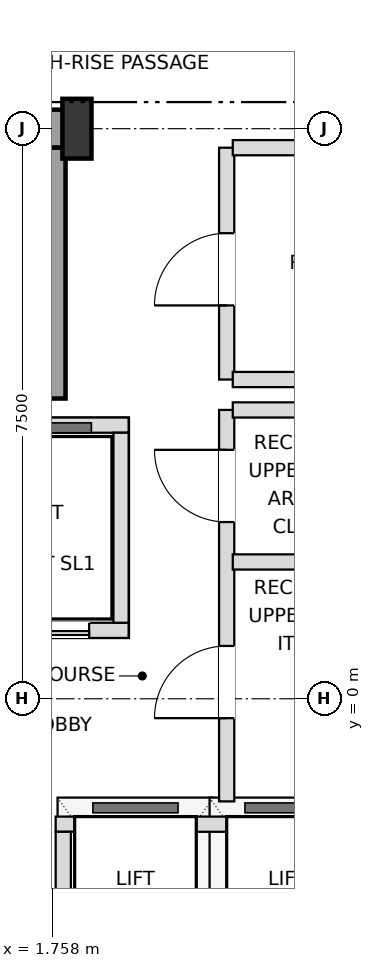
"""IFC4 building model, lengths in metres.
Left out: names, types, materials, properties, quantities, classifications, styles, units other than length and angle.
Written with IfcOpenShell. Run it as: python <this file> out.ifc"""

import sys

from ifc_helpers import new_model, si_unit, direction, frame, frame_2d, origin, origin_2d, place, context, subcontext, project, spatial, rectangle, i_section, extrude, element, fill, save


model = new_model("IFC4")
c1 = context("Model", 3, precision=1e-05, world=origin(), true_north=direction((0.0, 1.0)))
c2 = subcontext(c1, "Body", "Model", "MODEL_VIEW")
j1 = project(units=[si_unit("LENGTHUNIT", "METRE"), si_unit("PLANEANGLEUNIT", "RADIAN")], contexts=[c1])
p1 = place(None, origin())
s1 = spatial("IfcSite", under=j1, at=p1, CompositionType="ELEMENT")
p2 = place(p1, origin())
s2 = spatial("IfcBuilding", under=s1, at=p2, CompositionType="ELEMENT")
p3 = place(p2, frame((0.0, 0.0, 229.5)))
s3 = spatial("IfcBuildingStorey", under=s2, at=p3, CompositionType="ELEMENT", Elevation=229.5)
p4 = place(p3, frame((2.08, 7.5, 0.0), z_axis=(0.0, 0.0, 1.0), x_axis=(1.0, 0.0, 0.0)))
e1 = element("IfcColumn", 1, at=p4, inside=s3, PredefinedType="COLUMN", context=c2, shape_type="SweptSolid", body=[
    extrude(i_section(OverallWidth=0.382, OverallDepth=0.786, WebThickness=0.02, FlangeThickness=0.033, at=origin_2d()), origin(), (0.0, 0.0, 1.0), 3.6),
])
p5 = place(p3, frame((0.0, 7.5, 0.0), z_axis=(0.0, 0.0, 1.0), x_axis=(1.0, 0.0, 0.0)))
e2 = element("IfcWall", 2, at=p5, inside=s3, PredefinedType="SHEAR", context=c2, shape_type="SweptSolid", body=[
    extrude(rectangle(XDim=2.08, YDim=0.5, at=frame_2d((1.04, 0.0))), origin(), (0.0, 0.0, 1.0), 3.38),
])
p6 = place(p3, frame((1.73, 3.95, 0.0), z_axis=(0.0, 0.0, 1.0), x_axis=(0.0, 1.0, 0.0)))
e3 = element("IfcWall", 3, at=p6, inside=s3, PredefinedType="SHEAR", context=c2, shape_type="SweptSolid", body=[
    extrude(rectangle(XDim=3.3, YDim=0.4, at=frame_2d((1.65, 0.0))), origin(), (0.0, 0.0, 1.0), 3.38),
])
p7 = place(p3, frame((-2.82, 0.9, 0.0), z_axis=(0.0, 0.0, 1.0), x_axis=(1.0, 0.0, 0.0)))
e4 = element("IfcWall", 4, at=p7, inside=s3, PredefinedType="SOLIDWALL", context=c2, shape_type="SweptSolid", body=[
    extrude(rectangle(XDim=5.58, YDim=0.2, at=frame_2d((2.79, 0.0))), origin(), (0.0, 0.0, 1.0), 3.38),
])
p8 = place(p7, frame((0.49, 0.0, 0.0)))
e5 = element("IfcOpeningElement", 5, at=p8, cuts=e4, PredefinedType="OPENING", context=c2, shape_type="SweptSolid", body=[
    extrude(rectangle(XDim=1.1, YDim=2.15, at=frame_2d((0.55, 1.075))), frame((0.0, 0.11, 0.0), z_axis=(0.0, -1.0, 0.0), x_axis=(1.0, 0.0, 0.0)), (0.0, 0.0, 1.0), 0.22),
])
p9 = place(p7, frame((2.17, 0.0, 0.0)))
e6 = element("IfcOpeningElement", 6, at=p9, cuts=e4, PredefinedType="OPENING", context=c2, shape_type="SweptSolid", body=[
    extrude(rectangle(XDim=1.1, YDim=2.15, at=frame_2d((0.55, 1.075))), frame((0.0, 0.11, 0.0), z_axis=(0.0, -1.0, 0.0), x_axis=(1.0, 0.0, 0.0)), (0.0, 0.0, 1.0), 0.22),
])
p10 = place(p7, frame((3.86, 0.0, 0.0)))
e7 = element("IfcOpeningElement", 7, at=p10, cuts=e4, PredefinedType="OPENING", context=c2, shape_type="SweptSolid", body=[
    extrude(rectangle(XDim=1.2, YDim=2.2, at=frame_2d((0.6, 1.1))), frame((0.0, 0.11, 0.0), z_axis=(0.0, -1.0, 0.0), x_axis=(1.0, 0.0, 0.0)), (0.0, 0.0, 1.0), 0.22),
])
p11 = place(p3, frame((-2.82, 3.6, 0.0), z_axis=(0.0, 0.0, 1.0), x_axis=(1.0, 0.0, 0.0)))
e8 = element("IfcWall", 8, at=p11, inside=s3, PredefinedType="SOLIDWALL", context=c2, shape_type="SweptSolid", body=[
    extrude(rectangle(XDim=5.58, YDim=0.2, at=frame_2d((2.79, 0.0))), origin(), (0.0, 0.0, 1.0), 3.38),
])
p12 = place(p3, frame((2.66, 1.0, 0.0), z_axis=(0.0, 0.0, 1.0), x_axis=(0.0, 1.0, 0.0)))
e9 = element("IfcWall", 9, at=p12, inside=s3, PredefinedType="SOLIDWALL", context=c2, shape_type="SweptSolid", body=[
    extrude(rectangle(XDim=2.5, YDim=0.2, at=frame_2d((1.25, 0.0))), origin(), (0.0, 0.0, 1.0), 3.38),
])
p13 = place(p3, frame((1.8, -1.65, 0.0), z_axis=(0.0, 0.0, 1.0), x_axis=(1.0, 0.0, 0.0)))
e10 = element("IfcWall", 10, at=p13, inside=s3, PredefinedType="SOLIDWALL", context=c2, shape_type="SweptSolid", body=[
    extrude(rectangle(XDim=4.1, YDim=0.2, at=frame_2d((2.05, 0.0))), origin(), (0.0, 0.0, 1.0), 3.38),
])
p14 = place(p3, frame((1.9, -3.75, 0.0), z_axis=(0.0, 0.0, 1.0), x_axis=(0.0, 1.0, 0.0)))
e11 = element("IfcWall", 11, at=p14, inside=s3, PredefinedType="SOLIDWALL", context=c2, shape_type="SweptSolid", body=[
    extrude(rectangle(XDim=2.0, YDim=0.2, at=frame_2d((1.0, 0.0))), origin(), (0.0, 0.0, 1.0), 3.38),
])
p15 = place(p3, frame((4.05, -1.35, 0.0), z_axis=(0.0, 0.0, 1.0), x_axis=(0.0, 1.0, 0.0)))
e12 = element("IfcWall", 12, at=p15, inside=s3, PredefinedType="SOLIDWALL", context=c2, shape_type="SweptSolid", body=[
    extrude(rectangle(XDim=5.15, YDim=0.2, at=frame_2d((2.575, 0.0))), origin(), (0.0, 0.0, 1.0), 3.38),
])
p16 = place(p15, frame((1.095, 0.0, 0.0)))
e13 = element("IfcOpeningElement", 13, at=p16, cuts=e12, PredefinedType="OPENING", context=c2, shape_type="SweptSolid", body=[
    extrude(rectangle(XDim=0.95, YDim=2.15, at=frame_2d((0.475, 1.075))), frame((0.0, 0.11, 0.0), z_axis=(0.0, -1.0, 0.0), x_axis=(1.0, 0.0, 0.0)), (0.0, 0.0, 1.0), 0.22),
])
p17 = place(p15, frame((3.675, 0.0, 0.0)))
e14 = element("IfcOpeningElement", 14, at=p17, cuts=e12, PredefinedType="OPENING", context=c2, shape_type="SweptSolid", body=[
    extrude(rectangle(XDim=0.95, YDim=2.15, at=frame_2d((0.475, 1.075))), frame((0.0, 0.11, 0.0), z_axis=(0.0, -1.0, 0.0), x_axis=(1.0, 0.0, 0.0)), (0.0, 0.0, 1.0), 0.22),
])
p18 = place(p3, frame((4.05, 4.2, 0.0), z_axis=(0.0, 0.0, 1.0), x_axis=(0.0, 1.0, 0.0)))
e15 = element("IfcWall", 15, at=p18, inside=s3, PredefinedType="SOLIDWALL", context=c2, shape_type="SweptSolid", body=[
    extrude(rectangle(XDim=3.05, YDim=0.2, at=frame_2d((1.525, 0.0))), origin(), (0.0, 0.0, 1.0), 3.38),
])
p19 = place(p18, frame((0.975, 0.0, 0.0)))
e16 = element("IfcOpeningElement", 16, at=p19, cuts=e15, PredefinedType="OPENING", context=c2, shape_type="SweptSolid", body=[
    extrude(rectangle(XDim=0.95, YDim=2.15, at=frame_2d((0.475, 1.075))), frame((0.0, 0.11, 0.0), z_axis=(0.0, -1.0, 0.0), x_axis=(1.0, 0.0, 0.0)), (0.0, 0.0, 1.0), 0.22),
])
for number, where, z_axis, x_axis in (
    (17, (4.13, 1.8, 0.0), (0.0, 0.0, 1.0), (1.0, 0.0, 0.0)),
    (18, (4.13, 3.8, 0.0), (0.0, 0.0, 1.0), (1.0, 0.0, 0.0)),
):
    element("IfcWall", number, at=place(p3, frame(where, z_axis=z_axis, x_axis=x_axis)), inside=s3, PredefinedType="SOLIDWALL", context=c2, shape_type="SweptSolid", body=[
        extrude(rectangle(XDim=2.04, YDim=0.2, at=frame_2d((1.02, 0.0))), origin(), (0.0, 0.0, 1.0), 3.38),
    ])
for number, where, z_axis, x_axis in (
    (19, (4.13, 4.2, 0.0), (0.0, 0.0, 1.0), (1.0, 0.0, 0.0)),
    (20, (4.13, 7.25, 0.0), (0.0, 0.0, 1.0), (1.0, 0.0, 0.0)),
):
    element("IfcWall", number, at=place(p3, frame(where, z_axis=z_axis, x_axis=x_axis)), inside=s3, PredefinedType="SOLIDWALL", context=c2, shape_type="SweptSolid", body=[
        extrude(rectangle(XDim=2.07, YDim=0.2, at=frame_2d((1.035, 0.0))), origin(), (0.0, 0.0, 1.0), 3.38),
    ])
p20 = place(p10, origin())
e21 = element("IfcDoor", 21, at=p20, inside=s3, OperationType="DOUBLE_DOOR_SLIDING", PredefinedType="DOOR", context=c2, shape_type="SweptSolid", body=[
    extrude(rectangle(XDim=1.2, YDim=2.2, at=frame_2d((0.6, 1.1))), frame((0.0, 0.025, 0.0), z_axis=(0.0, -1.0, 0.0), x_axis=(1.0, 0.0, 0.0)), (0.0, 0.0, 1.0), 0.05),
])
fill(e7, e21)
p21 = place(p16, origin())
e22 = element("IfcDoor", 22, at=p21, inside=s3, OperationType="SINGLE_SWING_LEFT", PredefinedType="DOOR", context=c2, shape_type="SweptSolid", body=[
    extrude(rectangle(XDim=0.95, YDim=2.15, at=frame_2d((0.475, 1.075))), frame((0.0, 0.025, 0.0), z_axis=(0.0, -1.0, 0.0), x_axis=(1.0, 0.0, 0.0)), (0.0, 0.0, 1.0), 0.05),
])
fill(e13, e22)
p22 = place(p17, origin())
e23 = element("IfcDoor", 23, at=p22, inside=s3, OperationType="SINGLE_SWING_RIGHT", PredefinedType="DOOR", context=c2, shape_type="SweptSolid", body=[
    extrude(rectangle(XDim=0.95, YDim=2.15, at=frame_2d((0.475, 1.075))), frame((0.0, 0.025, 0.0), z_axis=(0.0, -1.0, 0.0), x_axis=(1.0, 0.0, 0.0)), (0.0, 0.0, 1.0), 0.05),
])
fill(e14, e23)
p23 = place(p19, origin())
e24 = element("IfcDoor", 24, at=p23, inside=s3, OperationType="SINGLE_SWING_LEFT", PredefinedType="DOOR", context=c2, shape_type="SweptSolid", body=[
    extrude(rectangle(XDim=0.95, YDim=2.15, at=frame_2d((0.475, 1.075))), frame((0.0, 0.025, 0.0), z_axis=(0.0, -1.0, 0.0), x_axis=(1.0, 0.0, 0.0)), (0.0, 0.0, 1.0), 0.05),
])
fill(e16, e24)
save(model, sys.argv[1])
